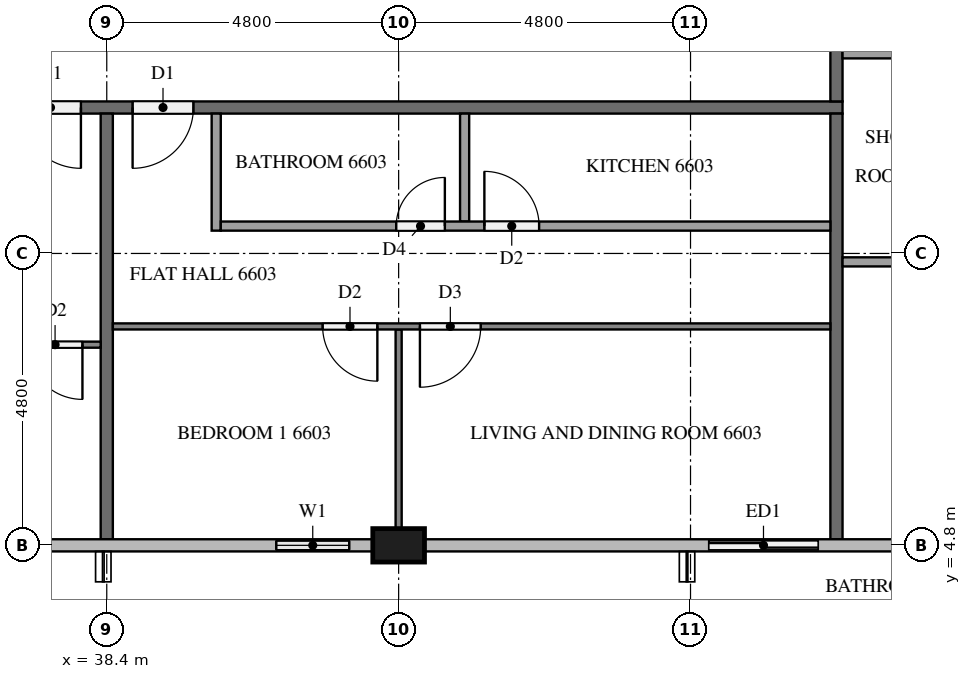
"""IFC4 building model, lengths in metres.
Left out: names, types, materials, properties, quantities, classifications, styles, units other than length and angle.
Written with IfcOpenShell. Run it as: python <this file> out.ifc"""

import sys

from ifc_helpers import new_model, si_unit, direction, frame, frame_2d, origin, origin_2d, place, context, subcontext, project, spatial, rectangle, extrude, element, fill, save


model = new_model("IFC4")
c1 = context("Model", 3, precision=1e-05, world=origin(), true_north=direction((0.0, 1.0)))
c2 = subcontext(c1, "Body", "Model", "MODEL_VIEW")
j1 = project(units=[si_unit("LENGTHUNIT", "METRE"), si_unit("PLANEANGLEUNIT", "RADIAN")], contexts=[c1])
p1 = place(None, origin())
s1 = spatial("IfcSite", under=j1, at=p1, CompositionType="ELEMENT")
p2 = place(p1, origin())
s2 = spatial("IfcBuilding", under=s1, at=p2, CompositionType="ELEMENT")
p3 = place(p2, frame((0.0, 0.0, 252.7)))
s3 = spatial("IfcBuildingStorey", under=s2, at=p3, CompositionType="ELEMENT", Elevation=252.7)
p4 = place(p3, frame((43.2, 4.8, 0.0), z_axis=(0.0, 0.0, 1.0), x_axis=(1.0, 0.0, 0.0)))
e1 = element("IfcColumn", 1, at=p4, inside=s3, PredefinedType="COLUMN", context=c2, shape_type="SweptSolid", body=[
    extrude(rectangle(XDim=0.85, YDim=0.55, at=origin_2d()), origin(), (0.0, 0.0, 1.0), 3.2),
])
p5 = place(p3, frame((40.8, 4.8, 0.0), z_axis=(0.0, 0.0, 1.0), x_axis=(1.0, 0.0, 0.0)))
e2 = element("IfcWall", 2, at=p5, inside=s3, PredefinedType="SOLIDWALL", context=c2, shape_type="SweptSolid", body=[
    extrude(rectangle(XDim=1.975, YDim=0.15, at=frame_2d((0.987, 0.0))), origin(), (0.0, 0.0, 1.0), 3.2),
])
p6 = place(p5, frame((0.387, 0.0, 0.9)))
e3 = element("IfcOpeningElement", 3, at=p6, cuts=e2, PredefinedType="OPENING", context=c2, shape_type="SweptSolid", body=[
    extrude(rectangle(XDim=1.2, YDim=1.4, at=frame_2d((0.6, 0.7))), frame((0.0, 0.085, 0.0), z_axis=(0.0, -1.0, 0.0), x_axis=(1.0, 0.0, 0.0)), (0.0, 0.0, 1.0), 0.17),
])
p7 = place(p3, frame((48.0, 4.8, 0.0), z_axis=(0.0, 0.0, 1.0), x_axis=(1.0, 0.0, 0.0)))
e4 = element("IfcWall", 4, at=p7, inside=s3, PredefinedType="SOLIDWALL", context=c2, shape_type="SweptSolid", body=[
    extrude(rectangle(XDim=2.4, YDim=0.15, at=frame_2d((1.2, 0.0))), origin(), (0.0, 0.0, 1.0), 3.2),
])
p8 = place(p7, frame((0.3, 0.0, 0.0)))
e5 = element("IfcOpeningElement", 5, at=p8, cuts=e4, PredefinedType="OPENING", context=c2, shape_type="SweptSolid", body=[
    extrude(rectangle(XDim=1.8, YDim=2.4, at=frame_2d((0.9, 1.2))), frame((0.0, 0.085, 0.0), z_axis=(0.0, -1.0, 0.0), x_axis=(1.0, 0.0, 0.0)), (0.0, 0.0, 1.0), 0.17),
])
p9 = place(p3, frame((50.5, 12.0, 0.0), z_axis=(0.0, 0.0, 1.0), x_axis=(-1.0, 0.0, 0.0)))
e6 = element("IfcWall", 6, at=p9, inside=s3, PredefinedType="PARTITIONING", context=c2, shape_type="SweptSolid", body=[
    extrude(rectangle(XDim=38.6, YDim=0.2, at=frame_2d((19.3, 0.0))), origin(), (0.0, 0.0, 1.0), 3.2),
])
p10 = place(p9, frame((37.075, 0.0, 0.0)))
e7 = element("IfcOpeningElement", 7, at=p10, cuts=e6, PredefinedType="OPENING", context=c2, shape_type="SweptSolid", body=[
    extrude(rectangle(XDim=1.0, YDim=2.1, at=frame_2d((0.5, 1.05))), frame((0.0, 0.11, 0.0), z_axis=(0.0, -1.0, 0.0), x_axis=(1.0, 0.0, 0.0)), (0.0, 0.0, 1.0), 0.22),
])
p11 = place(p9, frame((12.525, 0.0, 0.0)))
e8 = element("IfcOpeningElement", 8, at=p11, cuts=e6, PredefinedType="OPENING", context=c2, shape_type="SweptSolid", body=[
    extrude(rectangle(XDim=1.0, YDim=2.1, at=frame_2d((0.5, 1.05))), frame((0.0, 0.11, 0.0), z_axis=(0.0, -1.0, 0.0), x_axis=(1.0, 0.0, 0.0)), (0.0, 0.0, 1.0), 0.22),
])
p12 = place(p9, frame((10.675, 0.0, 0.0)))
e9 = element("IfcOpeningElement", 9, at=p12, cuts=e6, PredefinedType="OPENING", context=c2, shape_type="SweptSolid", body=[
    extrude(rectangle(XDim=1.0, YDim=2.1, at=frame_2d((0.5, 1.05))), frame((0.0, 0.11, 0.0), z_axis=(0.0, -1.0, 0.0), x_axis=(1.0, 0.0, 0.0)), (0.0, 0.0, 1.0), 0.22),
])
p13 = place(p3, frame((50.4, 40.7, 0.0), z_axis=(0.0, 0.0, 1.0), x_axis=(0.0, -1.0, 0.0)))
e10 = element("IfcWall", 10, at=p13, inside=s3, PredefinedType="PARTITIONING", context=c2, shape_type="SweptSolid", body=[
    extrude(rectangle(XDim=28.6, YDim=0.2, at=frame_2d((14.3, 0.0))), origin(), (0.0, 0.0, 1.0), 3.2),
])
p14 = place(p13, frame((19.525, 0.0, 0.0)))
e11 = element("IfcOpeningElement", 11, at=p14, cuts=e10, PredefinedType="OPENING", context=c2, shape_type="SweptSolid", body=[
    extrude(rectangle(XDim=1.0, YDim=2.1, at=frame_2d((0.5, 1.05))), frame((0.0, 0.11, 0.0), z_axis=(0.0, -1.0, 0.0), x_axis=(1.0, 0.0, 0.0)), (0.0, 0.0, 1.0), 0.22),
])
p15 = place(p13, frame((17.675, 0.0, 0.0)))
e12 = element("IfcOpeningElement", 12, at=p15, cuts=e10, PredefinedType="OPENING", context=c2, shape_type="SweptSolid", body=[
    extrude(rectangle(XDim=1.0, YDim=2.1, at=frame_2d((0.5, 1.05))), frame((0.0, 0.11, 0.0), z_axis=(0.0, -1.0, 0.0), x_axis=(1.0, 0.0, 0.0)), (0.0, 0.0, 1.0), 0.22),
])
p16 = place(p13, frame((0.325, 0.0, 0.0)))
e13 = element("IfcOpeningElement", 13, at=p16, cuts=e10, PredefinedType="OPENING", context=c2, shape_type="SweptSolid", body=[
    extrude(rectangle(XDim=1.0, YDim=2.1, at=frame_2d((0.5, 1.05))), frame((0.0, 0.11, 0.0), z_axis=(0.0, -1.0, 0.0), x_axis=(1.0, 0.0, 0.0)), (0.0, 0.0, 1.0), 0.22),
])
for number, where, z_axis, x_axis in (
    (14, (38.4, 11.9, 0.0), (0.0, 0.0, 1.0), (0.0, -1.0, 0.0)),
    (15, (50.4, 11.9, 0.0), (0.0, 0.0, 1.0), (0.0, -1.0, 0.0)),
):
    element("IfcWall", number, at=place(p3, frame(where, z_axis=z_axis, x_axis=x_axis)), inside=s3, PredefinedType="PARTITIONING", context=c2, shape_type="SweptSolid", body=[
        extrude(rectangle(XDim=7.0, YDim=0.2, at=frame_2d((3.5, 0.0))), origin(), (0.0, 0.0, 1.0), 3.2),
    ])
p17 = place(p3, frame((38.3, 8.1, 0.0), z_axis=(0.0, 0.0, 1.0), x_axis=(-1.0, 0.0, 0.0)))
e16 = element("IfcWall", 16, at=p17, inside=s3, PredefinedType="PARTITIONING", context=c2, shape_type="SweptSolid", body=[
    extrude(rectangle(XDim=16.6, YDim=0.1, at=frame_2d((8.3, 0.0))), origin(), (0.0, 0.0, 1.0), 3.2),
])
p18 = place(p17, frame((0.3, 0.0, 0.0)))
e17 = element("IfcOpeningElement", 17, at=p18, cuts=e16, PredefinedType="OPENING", context=c2, shape_type="SweptSolid", body=[
    extrude(rectangle(XDim=0.9, YDim=2.1, at=frame_2d((0.45, 1.05))), frame((0.0, 0.06, 0.0), z_axis=(0.0, -1.0, 0.0), x_axis=(1.0, 0.0, 0.0)), (0.0, 0.0, 1.0), 0.12),
])
p19 = place(p17, frame((8.25, 0.0, 0.0)))
e18 = element("IfcOpeningElement", 18, at=p19, cuts=e16, PredefinedType="OPENING", context=c2, shape_type="SweptSolid", body=[
    extrude(rectangle(XDim=0.9, YDim=2.1, at=frame_2d((0.45, 1.05))), frame((0.0, 0.06, 0.0), z_axis=(0.0, -1.0, 0.0), x_axis=(1.0, 0.0, 0.0)), (0.0, 0.0, 1.0), 0.12),
])
p20 = place(p17, frame((9.85, 0.0, 0.0)))
e19 = element("IfcOpeningElement", 19, at=p20, cuts=e16, PredefinedType="OPENING", context=c2, shape_type="SweptSolid", body=[
    extrude(rectangle(XDim=1.0, YDim=2.1, at=frame_2d((0.5, 1.05))), frame((0.0, 0.06, 0.0), z_axis=(0.0, -1.0, 0.0), x_axis=(1.0, 0.0, 0.0)), (0.0, 0.0, 1.0), 0.12),
])
p21 = place(p3, frame((43.2, 8.35, 0.0), z_axis=(0.0, 0.0, 1.0), x_axis=(0.0, -1.0, 0.0)))
e20 = element("IfcWall", 20, at=p21, inside=s3, PredefinedType="PARTITIONING", context=c2, shape_type="SweptSolid", body=[
    extrude(rectangle(XDim=3.275, YDim=0.1, at=frame_2d((1.638, 0.0))), origin(), (0.0, 0.0, 1.0), 3.2),
])
p22 = place(p3, frame((50.3, 8.4, 0.0), z_axis=(0.0, 0.0, 1.0), x_axis=(-1.0, 0.0, 0.0)))
e21 = element("IfcWall", 21, at=p22, inside=s3, PredefinedType="PARTITIONING", context=c2, shape_type="SweptSolid", body=[
    extrude(rectangle(XDim=11.8, YDim=0.1, at=frame_2d((5.9, 0.0))), origin(), (0.0, 0.0, 1.0), 3.2),
])
p23 = place(p22, frame((7.45, 0.0, 0.0)))
e22 = element("IfcOpeningElement", 22, at=p23, cuts=e21, PredefinedType="OPENING", context=c2, shape_type="SweptSolid", body=[
    extrude(rectangle(XDim=0.9, YDim=2.1, at=frame_2d((0.45, 1.05))), frame((0.0, 0.06, 0.0), z_axis=(0.0, -1.0, 0.0), x_axis=(1.0, 0.0, 0.0)), (0.0, 0.0, 1.0), 0.12),
])
p24 = place(p22, frame((5.75, 0.0, 0.0)))
e23 = element("IfcOpeningElement", 23, at=p24, cuts=e21, PredefinedType="OPENING", context=c2, shape_type="SweptSolid", body=[
    extrude(rectangle(XDim=1.0, YDim=2.1, at=frame_2d((0.5, 1.05))), frame((0.0, 0.06, 0.0), z_axis=(0.0, -1.0, 0.0), x_axis=(1.0, 0.0, 0.0)), (0.0, 0.0, 1.0), 0.12),
])
p25 = place(p3, frame((44.285, 11.9, 0.0), z_axis=(0.0, 0.0, 1.0), x_axis=(0.0, -1.0, 0.0)))
e24 = element("IfcWall", 24, at=p25, inside=s3, PredefinedType="PARTITIONING", context=c2, shape_type="SweptSolid", body=[
    extrude(rectangle(XDim=1.775, YDim=0.15, at=frame_2d((0.887, 0.0))), origin(), (0.0, 0.0, 1.0), 3.2),
])
p26 = place(p3, frame((40.2, 11.9, 0.0), z_axis=(0.0, 0.0, 1.0), x_axis=(0.0, -1.0, 0.0)))
e25 = element("IfcWall", 25, at=p26, inside=s3, PredefinedType="PARTITIONING", context=c2, shape_type="SweptSolid", body=[
    extrude(rectangle(XDim=1.925, YDim=0.15, at=frame_2d((0.962, 0.0))), origin(), (0.0, 0.0, 1.0), 3.2),
])
p27 = place(p3, frame((40.275, 10.05, 0.0), z_axis=(0.0, 0.0, 1.0), x_axis=(1.0, 0.0, 0.0)))
e26 = element("IfcWall", 26, at=p27, inside=s3, PredefinedType="PARTITIONING", context=c2, shape_type="SweptSolid", body=[
    extrude(rectangle(XDim=10.025, YDim=0.15, at=frame_2d((5.013, 0.0))), origin(), (0.0, 0.0, 1.0), 3.2),
])
p28 = place(p27, frame((2.885, 0.0, 0.0)))
e27 = element("IfcOpeningElement", 27, at=p28, cuts=e26, PredefinedType="OPENING", context=c2, shape_type="SweptSolid", body=[
    extrude(rectangle(XDim=0.8, YDim=2.1, at=frame_2d((0.4, 1.05))), frame((0.0, 0.085, 0.0), z_axis=(0.0, -1.0, 0.0), x_axis=(1.0, 0.0, 0.0)), (0.0, 0.0, 1.0), 0.17),
])
p29 = place(p27, frame((4.335, 0.0, 0.0)))
e28 = element("IfcOpeningElement", 28, at=p29, cuts=e26, PredefinedType="OPENING", context=c2, shape_type="SweptSolid", body=[
    extrude(rectangle(XDim=0.9, YDim=2.1, at=frame_2d((0.45, 1.05))), frame((0.0, 0.085, 0.0), z_axis=(0.0, -1.0, 0.0), x_axis=(1.0, 0.0, 0.0)), (0.0, 0.0, 1.0), 0.17),
])
for number, where, z_axis, x_axis in (
    (29, (50.5, 12.883, 0.0), (0.0, 0.0, 1.0), (1.0, 0.0, 0.0)),
    (30, (50.5, 9.461, 0.0), (0.0, 0.0, 1.0), (1.0, 0.0, 0.0)),
):
    element("IfcWall", number, at=place(p3, frame(where, z_axis=z_axis, x_axis=x_axis)), inside=s3, PredefinedType="PARTITIONING", context=c2, shape_type="SweptSolid", body=[
        extrude(rectangle(XDim=2.075, YDim=0.15, at=frame_2d((1.038, 0.0))), origin(), (0.0, 0.0, 1.0), 3.2),
    ])
p30 = place(p6, origin())
e31 = element("IfcWindow", 31, at=p30, inside=s3, PartitioningType="SINGLE_PANEL", PredefinedType="WINDOW", context=c2, shape_type="SweptSolid", body=[
    extrude(rectangle(XDim=1.2, YDim=1.4, at=frame_2d((0.6, 0.7))), frame((0.0, 0.03, 0.0), z_axis=(0.0, -1.0, 0.0), x_axis=(1.0, 0.0, 0.0)), (0.0, 0.0, 1.0), 0.06),
])
fill(e3, e31)
p31 = place(p8, origin())
e32 = element("IfcDoor", 32, at=p31, inside=s3, OperationType="SLIDING_TO_RIGHT", PredefinedType="DOOR", context=c2, shape_type="SweptSolid", body=[
    extrude(rectangle(XDim=1.8, YDim=2.4, at=frame_2d((0.9, 1.2))), frame((0.0, 0.025, 0.0), z_axis=(0.0, -1.0, 0.0), x_axis=(1.0, 0.0, 0.0)), (0.0, 0.0, 1.0), 0.05),
])
fill(e5, e32)
p32 = place(p11, origin())
e33 = element("IfcDoor", 33, at=p32, inside=s3, OperationType="SINGLE_SWING_LEFT", PredefinedType="DOOR", context=c2, shape_type="SweptSolid", body=[
    extrude(rectangle(XDim=1.0, YDim=2.1, at=frame_2d((0.5, 1.05))), frame((0.0, 0.025, 0.0), z_axis=(0.0, -1.0, 0.0), x_axis=(1.0, 0.0, 0.0)), (0.0, 0.0, 1.0), 0.05),
])
fill(e8, e33)
p33 = place(p12, origin())
e34 = element("IfcDoor", 34, at=p33, inside=s3, OperationType="SINGLE_SWING_RIGHT", PredefinedType="DOOR", context=c2, shape_type="SweptSolid", body=[
    extrude(rectangle(XDim=1.0, YDim=2.1, at=frame_2d((0.5, 1.05))), frame((0.0, 0.025, 0.0), z_axis=(0.0, -1.0, 0.0), x_axis=(1.0, 0.0, 0.0)), (0.0, 0.0, 1.0), 0.05),
])
fill(e9, e34)
p34 = place(p18, origin())
e35 = element("IfcDoor", 35, at=p34, inside=s3, OperationType="SINGLE_SWING_LEFT", PredefinedType="DOOR", context=c2, shape_type="SweptSolid", body=[
    extrude(rectangle(XDim=0.9, YDim=2.1, at=frame_2d((0.45, 1.05))), frame((0.0, 0.025, 0.0), z_axis=(0.0, -1.0, 0.0), x_axis=(1.0, 0.0, 0.0)), (0.0, 0.0, 1.0), 0.05),
])
fill(e17, e35)
p35 = place(p23, origin())
e36 = element("IfcDoor", 36, at=p35, inside=s3, OperationType="SINGLE_SWING_LEFT", PredefinedType="DOOR", context=c2, shape_type="SweptSolid", body=[
    extrude(rectangle(XDim=0.9, YDim=2.1, at=frame_2d((0.45, 1.05))), frame((0.0, 0.025, 0.0), z_axis=(0.0, -1.0, 0.0), x_axis=(1.0, 0.0, 0.0)), (0.0, 0.0, 1.0), 0.05),
])
fill(e22, e36)
p36 = place(p24, origin())
e37 = element("IfcDoor", 37, at=p36, inside=s3, OperationType="SINGLE_SWING_RIGHT", PredefinedType="DOOR", context=c2, shape_type="SweptSolid", body=[
    extrude(rectangle(XDim=1.0, YDim=2.1, at=frame_2d((0.5, 1.05))), frame((0.0, 0.025, 0.0), z_axis=(0.0, -1.0, 0.0), x_axis=(1.0, 0.0, 0.0)), (0.0, 0.0, 1.0), 0.05),
])
fill(e23, e37)
p37 = place(p28, origin())
e38 = element("IfcDoor", 38, at=p37, inside=s3, OperationType="SINGLE_SWING_RIGHT", PredefinedType="DOOR", context=c2, shape_type="SweptSolid", body=[
    extrude(rectangle(XDim=0.8, YDim=2.1, at=frame_2d((0.4, 1.05))), frame((0.0, 0.025, 0.0), z_axis=(0.0, -1.0, 0.0), x_axis=(1.0, 0.0, 0.0)), (0.0, 0.0, 1.0), 0.05),
])
fill(e27, e38)
p38 = place(p29, origin())
e39 = element("IfcDoor", 39, at=p38, inside=s3, OperationType="SINGLE_SWING_LEFT", PredefinedType="DOOR", context=c2, shape_type="SweptSolid", body=[
    extrude(rectangle(XDim=0.9, YDim=2.1, at=frame_2d((0.45, 1.05))), frame((0.0, 0.025, 0.0), z_axis=(0.0, -1.0, 0.0), x_axis=(1.0, 0.0, 0.0)), (0.0, 0.0, 1.0), 0.05),
])
fill(e28, e39)
save(model, sys.argv[1])
